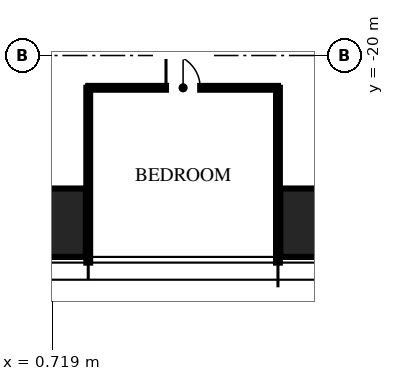
"""IFC4 building model, lengths in metres.
Left out: names, types, materials, properties, quantities, classifications, styles, units other than length and angle.
Written with IfcOpenShell. Run it as: python <this file> out.ifc"""

import sys

from ifc_helpers import new_model, si_unit, direction, frame, frame_2d, origin, origin_2d, place, context, subcontext, project, spatial, rectangle, hollow_rectangle, extrude, element, fill, save


model = new_model("IFC4")
c1 = context("Model", 3, precision=1e-05, world=origin(), true_north=direction((0.0, 1.0)))
c2 = subcontext(c1, "Body", "Model", "MODEL_VIEW")
j1 = project(units=[si_unit("LENGTHUNIT", "METRE"), si_unit("PLANEANGLEUNIT", "RADIAN")], contexts=[c1])
p1 = place(None, origin())
s1 = spatial("IfcSite", under=j1, at=p1, CompositionType="ELEMENT")
p2 = place(p1, origin())
s2 = spatial("IfcBuilding", under=s1, at=p2, CompositionType="ELEMENT")
p3 = place(p2, frame((0.0, 0.0, 270.75)))
s3 = spatial("IfcBuildingStorey", under=s2, at=p3, CompositionType="ELEMENT", Elevation=270.75)
for number, where, z_axis, x_axis in (
    (1, (8.32, -24.4, 0.0), (0.0, 0.0, 1.0), (1.0, 0.0, 0.0)),
    (2, (0.0, -24.4, 0.0), (0.0, 0.0, 1.0), (1.0, 0.0, 0.0)),
):
    element("IfcColumn", number, at=place(p3, frame(where, z_axis=z_axis, x_axis=x_axis)), inside=s3, PredefinedType="COLUMN", context=c2, shape_type="SweptSolid", body=[
        extrude(hollow_rectangle(XDim=3.2, YDim=1.8, WallThickness=0.14, at=origin_2d()), origin(), (0.0, 0.0, 1.0), 3.75),
    ])
for number, where, z_axis, x_axis in (
    (3, (1.664, -20.85, 0.0), (0.0, 0.0, 1.0), (0.0, -1.0, 0.0)),
    (4, (6.656, -20.85, 0.0), (0.0, 0.0, 1.0), (0.0, -1.0, 0.0)),
):
    element("IfcWall", number, at=place(p3, frame(where, z_axis=z_axis, x_axis=x_axis)), inside=s3, PredefinedType="PARTITIONING", context=c2, shape_type="SweptSolid", body=[
        extrude(rectangle(XDim=4.6, YDim=0.1, at=frame_2d((2.3, 0.0))), origin(), (0.0, 0.0, 1.0), 2.81),
    ])
p4 = place(p3, frame((1.664, -20.85, 0.0), z_axis=(0.0, 0.0, 1.0), x_axis=(1.0, 0.0, 0.0)))
e5 = element("IfcWall", 5, at=p4, inside=s3, PredefinedType="PARTITIONING", context=c2, shape_type="SweptSolid", body=[
    extrude(rectangle(XDim=4.992, YDim=0.1, at=frame_2d((2.496, 0.0))), origin(), (0.0, 0.0, 1.0), 2.71),
])
p5 = place(p4, frame((2.046, 0.0, 0.0)))
e6 = element("IfcOpeningElement", 6, at=p5, cuts=e5, PredefinedType="OPENING", context=c2, shape_type="SweptSolid", body=[
    extrude(rectangle(XDim=0.9, YDim=2.1, at=frame_2d((0.45, 1.05))), frame((0.0, 0.06, 0.0), z_axis=(0.0, -1.0, 0.0), x_axis=(1.0, 0.0, 0.0)), (0.0, 0.0, 1.0), 0.12),
])
p6 = place(p5, origin())
e7 = element("IfcDoor", 7, at=p6, inside=s3, OperationType="SINGLE_SWING_LEFT", PredefinedType="DOOR", context=c2, shape_type="SweptSolid", body=[
    extrude(rectangle(XDim=0.9, YDim=2.1, at=frame_2d((0.45, 1.05))), frame((0.0, 0.025, 0.0), z_axis=(0.0, -1.0, 0.0), x_axis=(1.0, 0.0, 0.0)), (0.0, 0.0, 1.0), 0.05),
])
fill(e6, e7)
save(model, sys.argv[1])
